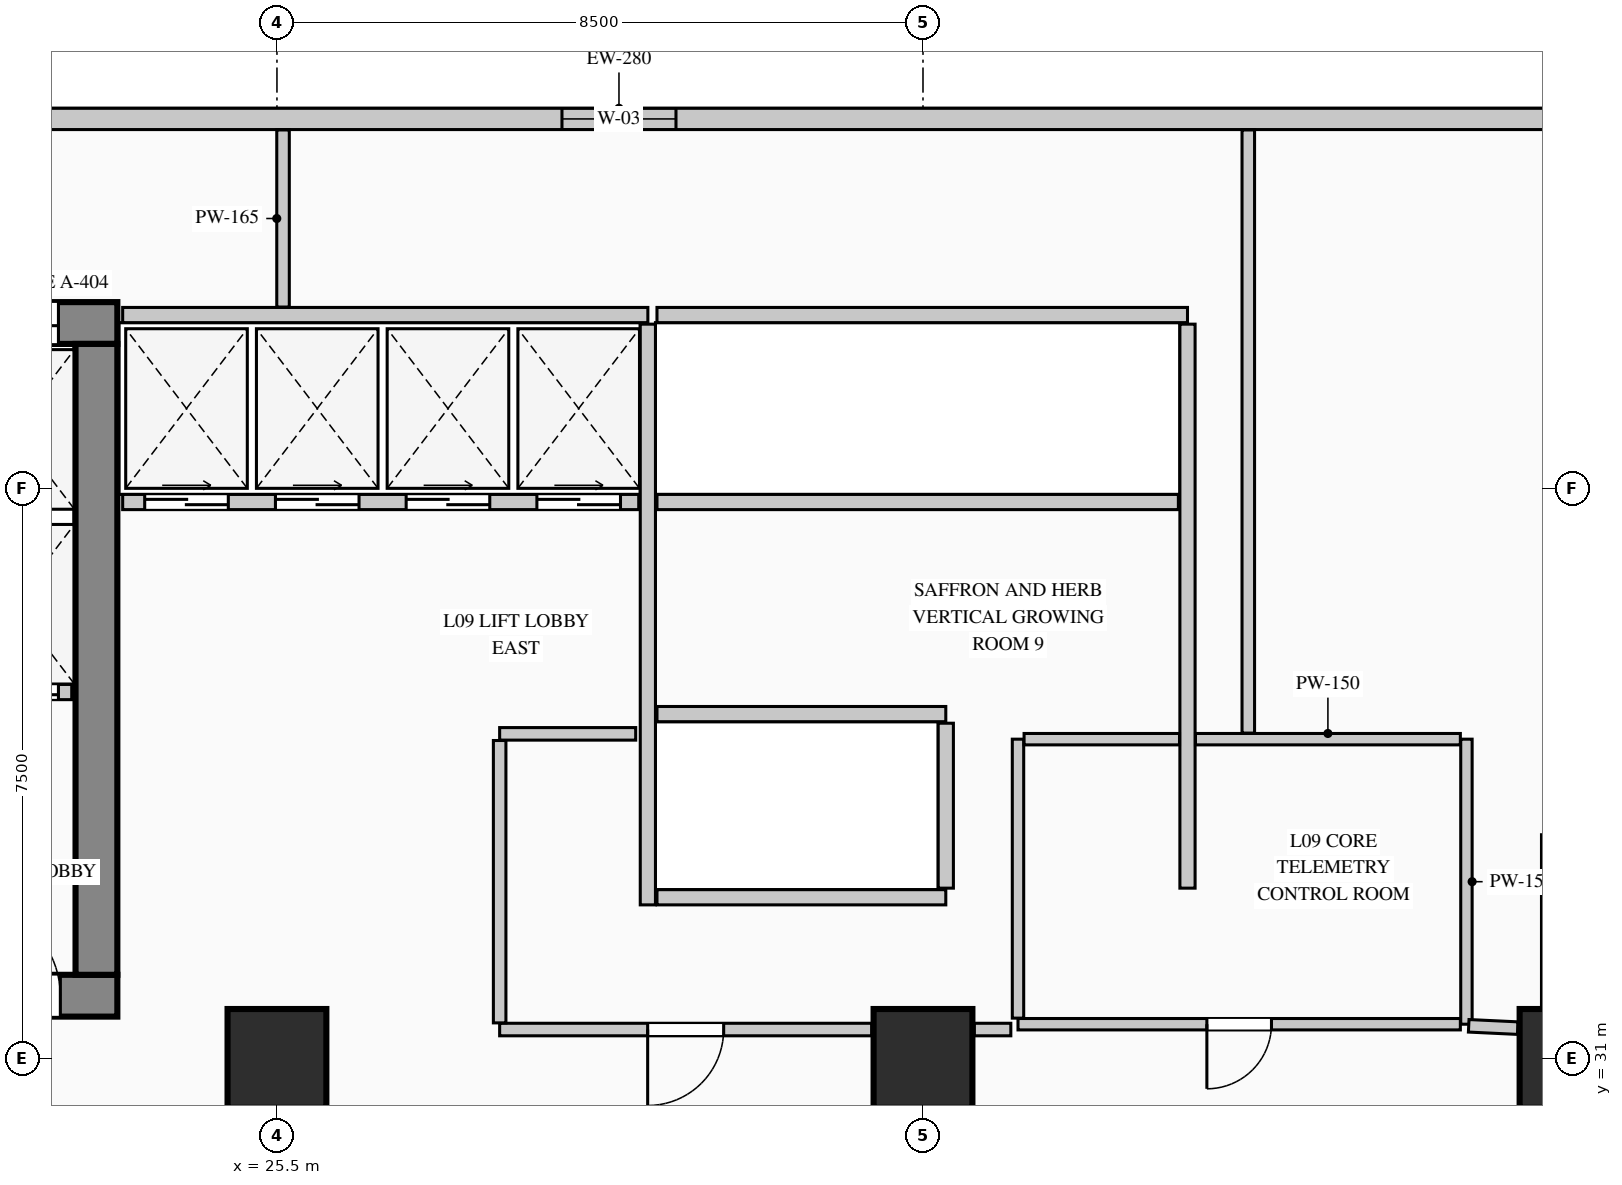
"""IFC4 building model, lengths in metres.
Left out: names, types, materials, properties, quantities, classifications, styles, units other than length and angle.
Written with IfcOpenShell. Run it as: python <this file> out.ifc"""

import sys

from ifc_helpers import new_model, si_unit, direction, frame, frame_2d, origin, origin_2d, place, context, subcontext, project, spatial, rectangle, extrude, element, fill, save


model = new_model("IFC4")
c1 = context("Model", 3, precision=1e-05, world=origin(), true_north=direction((0.0, 1.0)))
c2 = subcontext(c1, "Body", "Model", "MODEL_VIEW")
j1 = project(units=[si_unit("LENGTHUNIT", "METRE"), si_unit("PLANEANGLEUNIT", "RADIAN")], contexts=[c1])
p1 = place(None, origin())
s1 = spatial("IfcSite", under=j1, at=p1, CompositionType="ELEMENT")
p2 = place(p1, origin())
s2 = spatial("IfcBuilding", under=s1, at=p2, CompositionType="ELEMENT")
p3 = place(p2, frame((0.0, 0.0, 40.2)))
s3 = spatial("IfcBuildingStorey", under=s2, at=p3, CompositionType="ELEMENT", Elevation=40.2)
p4 = place(p3, frame((5.45, 40.675, 0.0), z_axis=(0.0, 0.0, 1.0), x_axis=(1.0, 0.0, 0.0)))
e1 = element("IfcWall", 1, at=p4, inside=s3, PredefinedType="SHEAR", context=c2, shape_type="SweptSolid", body=[
    extrude(rectangle(XDim=17.95, YDim=0.55, at=frame_2d((8.975, 0.0))), origin(), (0.0, 0.0, 1.0), 4.4),
])
p5 = place(p4, frame((15.995, 0.0, 0.0)))
e2 = element("IfcOpeningElement", 2, at=p5, cuts=e1, PredefinedType="OPENING", context=c2, shape_type="SweptSolid", body=[
    extrude(rectangle(XDim=1.18, YDim=2.25, at=frame_2d((0.59, 1.125))), frame((0.0, 0.285, 0.0), z_axis=(0.0, -1.0, 0.0), x_axis=(1.0, 0.0, 0.0)), (0.0, 0.0, 1.0), 0.57),
])
p6 = place(p3, frame((5.45, 31.825, 0.0), z_axis=(0.0, 0.0, 1.0), x_axis=(1.0, 0.0, 0.0)))
e3 = element("IfcWall", 3, at=p6, inside=s3, PredefinedType="SHEAR", context=c2, shape_type="SweptSolid", body=[
    extrude(rectangle(XDim=17.95, YDim=0.55, at=frame_2d((8.975, 0.0))), origin(), (0.0, 0.0, 1.0), 4.4),
])
p7 = place(p6, frame((3.2, 0.0, 0.0)))
e4 = element("IfcOpeningElement", 4, at=p7, cuts=e3, PredefinedType="OPENING", context=c2, shape_type="SweptSolid", body=[
    extrude(rectangle(XDim=1.2, YDim=2.2, at=frame_2d((0.6, 1.1))), frame((0.0, 0.285, 0.0), z_axis=(0.0, -1.0, 0.0), x_axis=(1.0, 0.0, 0.0)), (0.0, 0.0, 1.0), 0.57),
])
p8 = place(p6, frame((7.05, 0.0, 0.0)))
e5 = element("IfcOpeningElement", 5, at=p8, cuts=e3, PredefinedType="OPENING", context=c2, shape_type="SweptSolid", body=[
    extrude(rectangle(XDim=1.2, YDim=2.2, at=frame_2d((0.6, 1.1))), frame((0.0, 0.285, 0.0), z_axis=(0.0, -1.0, 0.0), x_axis=(1.0, 0.0, 0.0)), (0.0, 0.0, 1.0), 0.57),
])
p9 = place(p6, frame((8.9, 0.0, 0.0)))
e6 = element("IfcOpeningElement", 6, at=p9, cuts=e3, PredefinedType="OPENING", context=c2, shape_type="SweptSolid", body=[
    extrude(rectangle(XDim=1.15, YDim=2.2, at=frame_2d((0.575, 1.1))), frame((0.0, 0.285, 0.0), z_axis=(0.0, -1.0, 0.0), x_axis=(1.0, 0.0, 0.0)), (0.0, 0.0, 1.0), 0.57),
])
p10 = place(p6, frame((16.0, 0.0, 0.0)))
e7 = element("IfcOpeningElement", 7, at=p10, cuts=e3, PredefinedType="OPENING", context=c2, shape_type="SweptSolid", body=[
    extrude(rectangle(XDim=1.2, YDim=2.2, at=frame_2d((0.6, 1.1))), frame((0.0, 0.285, 0.0), z_axis=(0.0, -1.0, 0.0), x_axis=(1.0, 0.0, 0.0)), (0.0, 0.0, 1.0), 0.57),
])
p11 = place(p3, frame((23.125, 32.1, 0.0), z_axis=(0.0, 0.0, 1.0), x_axis=(0.0, 1.0, 0.0)))
e8 = element("IfcWall", 8, at=p11, inside=s3, PredefinedType="SHEAR", context=c2, shape_type="SweptSolid", body=[
    extrude(rectangle(XDim=8.3, YDim=0.55, at=frame_2d((4.15, 0.0))), origin(), (0.0, 0.0, 1.0), 4.4),
])
for number, where, z_axis, x_axis in (
    (9, (25.5, 31.0, 0.0), (0.0, 0.0, 1.0), (1.0, 0.0, 0.0)),
    (10, (34.0, 31.0, 0.0), (0.0, 0.0, 1.0), (1.0, 0.0, 0.0)),
    (11, (42.5, 31.0, 0.0), (0.0, 0.0, 1.0), (1.0, 0.0, 0.0)),
):
    element("IfcColumn", number, at=place(p3, frame(where, z_axis=z_axis, x_axis=x_axis)), inside=s3, PredefinedType="COLUMN", context=c2, shape_type="SweptSolid", body=[
        extrude(rectangle(XDim=1.3, YDim=1.3, at=origin_2d()), origin(), (0.0, 0.0, 1.0), 4.4),
    ])
p12 = place(p3, frame((4.84, 43.36, 0.0), z_axis=(0.0, 0.0, 1.0), x_axis=(1.0, 0.0, 0.0)))
e12 = element("IfcWall", 12, at=p12, inside=s3, PredefinedType="STANDARD", context=c2, shape_type="SweptSolid", body=[
    extrude(rectangle(XDim=50.32, YDim=0.28, at=frame_2d((25.16, 0.0))), origin(), (0.0, 0.0, 1.0), 4.1),
])
p13 = place(p12, frame((24.41, 0.0, 0.9)))
e13 = element("IfcOpeningElement", 13, at=p13, cuts=e12, PredefinedType="OPENING", context=c2, shape_type="SweptSolid", body=[
    extrude(rectangle(XDim=1.5, YDim=1.8, at=frame_2d((0.75, 0.9))), frame((0.0, 0.15, 0.0), z_axis=(0.0, -1.0, 0.0), x_axis=(1.0, 0.0, 0.0)), (0.0, 0.0, 1.0), 0.3),
])
p14 = place(p3, frame((21.3, 35.82, 0.0), z_axis=(0.0, 0.0, 1.0), x_axis=(1.0, 0.0, 0.0)))
e14 = element("IfcWall", 14, at=p14, inside=s3, PredefinedType="PARTITIONING", context=c2, shape_type="SweptSolid", body=[
    extrude(rectangle(XDim=1.5, YDim=0.2, at=frame_2d((0.75, 0.0))), origin(), (0.0, 0.0, 1.0), 4.1),
])
p15 = place(p14, frame((0.145, 0.0, 0.0)))
e15 = element("IfcOpeningElement", 15, at=p15, cuts=e14, PredefinedType="OPENING", context=c2, shape_type="SweptSolid", body=[
    extrude(rectangle(XDim=1.18, YDim=2.25, at=frame_2d((0.59, 1.125))), frame((0.0, 0.11, 0.0), z_axis=(0.0, -1.0, 0.0), x_axis=(1.0, 0.0, 0.0)), (0.0, 0.0, 1.0), 0.22),
])
p16 = place(p3, frame((23.47, 40.78, 0.0), z_axis=(0.0, 0.0, 1.0), x_axis=(1.0, 0.0, 0.0)))
e16 = element("IfcWall", 16, at=p16, inside=s3, PredefinedType="PARTITIONING", context=c2, shape_type="SweptSolid", body=[
    extrude(rectangle(XDim=6.91, YDim=0.2, at=frame_2d((3.455, 0.0))), origin(), (0.0, 0.0, 1.0), 4.1),
])
p17 = place(p3, frame((30.38, 33.02, 0.0), z_axis=(0.0, 0.0, 1.0), x_axis=(0.0, 1.0, 0.0)))
e17 = element("IfcWall", 17, at=p17, inside=s3, PredefinedType="PARTITIONING", context=c2, shape_type="SweptSolid", body=[
    extrude(rectangle(XDim=7.64, YDim=0.2, at=frame_2d((3.82, 0.0))), origin(), (0.0, 0.0, 1.0), 4.1),
])
p18 = place(p3, frame((23.47, 38.32, 0.0), z_axis=(0.0, 0.0, 1.0), x_axis=(1.0, 0.0, 0.0)))
e18 = element("IfcWall", 18, at=p18, inside=s3, PredefinedType="PARTITIONING", context=c2, shape_type="SweptSolid", body=[
    extrude(rectangle(XDim=6.79, YDim=0.2, at=frame_2d((3.395, 0.0))), origin(), (0.0, 0.0, 1.0), 4.1),
])
p19 = place(p18, frame((0.29, 0.0, 0.0)))
e19 = element("IfcOpeningElement", 19, at=p19, cuts=e18, PredefinedType="OPENING", context=c2, shape_type="SweptSolid", body=[
    extrude(rectangle(XDim=1.1, YDim=2.2, at=frame_2d((0.55, 1.1))), frame((0.0, 0.11, 0.0), z_axis=(0.0, -1.0, 0.0), x_axis=(1.0, 0.0, 0.0)), (0.0, 0.0, 1.0), 0.22),
])
p20 = place(p18, frame((2.01, 0.0, 0.0)))
e20 = element("IfcOpeningElement", 20, at=p20, cuts=e18, PredefinedType="OPENING", context=c2, shape_type="SweptSolid", body=[
    extrude(rectangle(XDim=1.1, YDim=2.2, at=frame_2d((0.55, 1.1))), frame((0.0, 0.11, 0.0), z_axis=(0.0, -1.0, 0.0), x_axis=(1.0, 0.0, 0.0)), (0.0, 0.0, 1.0), 0.22),
])
p21 = place(p18, frame((3.73, 0.0, 0.0)))
e21 = element("IfcOpeningElement", 21, at=p21, cuts=e18, PredefinedType="OPENING", context=c2, shape_type="SweptSolid", body=[
    extrude(rectangle(XDim=1.1, YDim=2.2, at=frame_2d((0.55, 1.1))), frame((0.0, 0.11, 0.0), z_axis=(0.0, -1.0, 0.0), x_axis=(1.0, 0.0, 0.0)), (0.0, 0.0, 1.0), 0.22),
])
p22 = place(p18, frame((5.45, 0.0, 0.0)))
e22 = element("IfcOpeningElement", 22, at=p22, cuts=e18, PredefinedType="OPENING", context=c2, shape_type="SweptSolid", body=[
    extrude(rectangle(XDim=1.1, YDim=2.2, at=frame_2d((0.55, 1.1))), frame((0.0, 0.11, 0.0), z_axis=(0.0, -1.0, 0.0), x_axis=(1.0, 0.0, 0.0)), (0.0, 0.0, 1.0), 0.22),
])
p23 = place(p3, frame((30.5, 40.78, 0.0), z_axis=(0.0, 0.0, 1.0), x_axis=(1.0, 0.0, 0.0)))
e23 = element("IfcWall", 23, at=p23, inside=s3, PredefinedType="PARTITIONING", context=c2, shape_type="SweptSolid", body=[
    extrude(rectangle(XDim=6.98, YDim=0.2, at=frame_2d((3.49, 0.0))), origin(), (0.0, 0.0, 1.0), 4.1),
])
p24 = place(p3, frame((37.48, 33.24, 0.0), z_axis=(0.0, 0.0, 1.0), x_axis=(0.0, 1.0, 0.0)))
e24 = element("IfcWall", 24, at=p24, inside=s3, PredefinedType="PARTITIONING", context=c2, shape_type="SweptSolid", body=[
    extrude(rectangle(XDim=7.42, YDim=0.2, at=frame_2d((3.71, 0.0))), origin(), (0.0, 0.0, 1.0), 4.1),
])
p25 = place(p3, frame((30.5, 38.32, 0.0), z_axis=(0.0, 0.0, 1.0), x_axis=(1.0, 0.0, 0.0)))
e25 = element("IfcWall", 25, at=p25, inside=s3, PredefinedType="PARTITIONING", context=c2, shape_type="SweptSolid", body=[
    extrude(rectangle(XDim=6.86, YDim=0.2, at=frame_2d((3.43, 0.0))), origin(), (0.0, 0.0, 1.0), 4.1),
])
for number, where, z_axis, x_axis in (
    (26, (30.5, 35.53, 0.0), (0.0, 0.0, 1.0), (1.0, 0.0, 0.0)),
    (27, (30.5, 33.12, 0.0), (0.0, 0.0, 1.0), (1.0, 0.0, 0.0)),
):
    element("IfcWall", number, at=place(p3, frame(where, z_axis=z_axis, x_axis=x_axis)), inside=s3, PredefinedType="PARTITIONING", context=c2, shape_type="SweptSolid", body=[
        extrude(rectangle(XDim=3.8, YDim=0.2, at=frame_2d((1.9, 0.0))), origin(), (0.0, 0.0, 1.0), 4.1),
    ])
p26 = place(p3, frame((34.3, 33.24, 0.0), z_axis=(0.0, 0.0, 1.0), x_axis=(0.0, 1.0, 0.0)))
e28 = element("IfcWall", 28, at=p26, inside=s3, PredefinedType="PARTITIONING", context=c2, shape_type="SweptSolid", body=[
    extrude(rectangle(XDim=2.17, YDim=0.2, at=frame_2d((1.085, 0.0))), origin(), (0.0, 0.0, 1.0), 4.1),
])
p27 = place(p3, frame((41.15, 35.2, 0.0), z_axis=(0.0, 0.0, 1.0), x_axis=(0.0, -1.0, 0.0)))
e29 = element("IfcWall", 29, at=p27, inside=s3, PredefinedType="PARTITIONING", context=c2, shape_type="SweptSolid", body=[
    extrude(rectangle(XDim=3.75, YDim=0.15, at=frame_2d((1.875, 0.0))), origin(), (0.0, 0.0, 1.0), 4.1),
])
p28 = place(p3, frame((41.07, 31.45, 0.0), z_axis=(0.0, 0.0, 1.0), x_axis=(-1.0, 0.0, 0.0)))
e30 = element("IfcWall", 30, at=p28, inside=s3, PredefinedType="PARTITIONING", context=c2, shape_type="SweptSolid", body=[
    extrude(rectangle(XDim=5.82, YDim=0.15, at=frame_2d((2.91, 0.0))), origin(), (0.0, 0.0, 1.0), 4.1),
])
p29 = place(p28, frame((2.485, 0.0, 0.0)))
e31 = element("IfcOpeningElement", 31, at=p29, cuts=e30, PredefinedType="OPENING", context=c2, shape_type="SweptSolid", body=[
    extrude(rectangle(XDim=0.85, YDim=2.1, at=frame_2d((0.425, 1.05))), frame((0.0, 0.085, 0.0), z_axis=(0.0, -1.0, 0.0), x_axis=(1.0, 0.0, 0.0)), (0.0, 0.0, 1.0), 0.17),
])
p30 = place(p3, frame((35.25, 31.53, 0.0), z_axis=(0.0, 0.0, 1.0), x_axis=(0.0, 1.0, 0.0)))
e32 = element("IfcWall", 32, at=p30, inside=s3, PredefinedType="PARTITIONING", context=c2, shape_type="SweptSolid", body=[
    extrude(rectangle(XDim=3.67, YDim=0.15, at=frame_2d((1.835, 0.0))), origin(), (0.0, 0.0, 1.0), 4.1),
])
p31 = place(p3, frame((35.33, 35.2, 0.0), z_axis=(0.0, 0.0, 1.0), x_axis=(1.0, 0.0, 0.0)))
e33 = element("IfcWall", 33, at=p31, inside=s3, PredefinedType="PARTITIONING", context=c2, shape_type="SweptSolid", body=[
    extrude(rectangle(XDim=2.045, YDim=0.15, at=frame_2d((1.022, 0.0))), origin(), (0.0, 0.0, 1.0), 4.1),
])
p32 = place(p3, frame((37.585, 35.2, 0.0), z_axis=(0.0, 0.0, 1.0), x_axis=(1.0, 0.0, 0.0)))
e34 = element("IfcWall", 34, at=p32, inside=s3, PredefinedType="PARTITIONING", context=c2, shape_type="SweptSolid", body=[
    extrude(rectangle(XDim=3.485, YDim=0.15, at=frame_2d((1.743, 0.0))), origin(), (0.0, 0.0, 1.0), 4.1),
])
p33 = place(p3, frame((38.28, 35.28, 0.0), z_axis=(0.0, 0.0, 1.0), x_axis=(0.0, 1.0, 0.0)))
e35 = element("IfcWall", 35, at=p33, inside=s3, PredefinedType="PARTITIONING", context=c2, shape_type="SweptSolid", body=[
    extrude(rectangle(XDim=7.935, YDim=0.165, at=frame_2d((3.968, 0.0))), origin(), (0.0, 0.0, 1.0), 4.1),
])
p34 = place(p3, frame((42.22, 33.942, 0.0), z_axis=(0.0, 0.0, 1.0), x_axis=(0.0, -1.0, 0.0)))
e36 = element("IfcWall", 36, at=p34, inside=s3, PredefinedType="PARTITIONING", context=c2, shape_type="SweptSolid", body=[
    extrude(rectangle(XDim=2.267, YDim=0.165, at=frame_2d((1.134, 0.0))), origin(), (0.0, 0.0, 1.0), 4.1),
])
p35 = place(p3, frame((41.825, 31.398, 0.0), z_axis=(0.0, 0.0, 1.0), x_axis=(-0.998882632516, 0.04725977633, 0.0)))
e37 = element("IfcWall", 37, at=p35, inside=s3, PredefinedType="PARTITIONING", context=c2, shape_type="SweptSolid", body=[
    extrude(rectangle(XDim=0.646, YDim=0.165, at=frame_2d((0.323, 0.0))), origin(), (0.0, 0.0, 1.0), 4.1),
])
p36 = place(p3, frame((28.43, 35.27, 0.0), z_axis=(0.0, 0.0, 1.0), x_axis=(1.0, 0.0, 0.0)))
e38 = element("IfcWall", 38, at=p36, inside=s3, PredefinedType="PARTITIONING", context=c2, shape_type="SweptSolid", body=[
    extrude(rectangle(XDim=1.79, YDim=0.165, at=frame_2d((0.895, 0.0))), origin(), (0.0, 0.0, 1.0), 4.1),
])
p37 = place(p3, frame((25.58, 40.885, 0.0), z_axis=(0.0, 0.0, 1.0), x_axis=(0.0, 1.0, 0.0)))
e39 = element("IfcWall", 39, at=p37, inside=s3, PredefinedType="PARTITIONING", context=c2, shape_type="SweptSolid", body=[
    extrude(rectangle(XDim=2.33, YDim=0.165, at=frame_2d((1.165, 0.0))), origin(), (0.0, 0.0, 1.0), 4.1),
])
p38 = place(p3, frame((35.156, 31.38, 0.0), z_axis=(0.0, 0.0, 1.0), x_axis=(-1.0, 0.0, 0.0)))
e40 = element("IfcWall", 40, at=p38, inside=s3, PredefinedType="PARTITIONING", context=c2, shape_type="SweptSolid", body=[
    extrude(rectangle(XDim=0.48, YDim=0.165, at=frame_2d((0.24, 0.0))), origin(), (0.0, 0.0, 1.0), 4.1),
])
p39 = place(p3, frame((33.325, 31.38, 0.0), z_axis=(0.0, 0.0, 1.0), x_axis=(-1.0, 0.0, 0.0)))
e41 = element("IfcWall", 41, at=p39, inside=s3, PredefinedType="PARTITIONING", context=c2, shape_type="SweptSolid", body=[
    extrude(rectangle(XDim=4.895, YDim=0.165, at=frame_2d((2.448, 0.0))), origin(), (0.0, 0.0, 1.0), 4.1),
])
p40 = place(p39, frame((1.948, 0.0, 0.0)))
e42 = element("IfcOpeningElement", 42, at=p40, cuts=e41, PredefinedType="OPENING", context=c2, shape_type="SweptSolid", body=[
    extrude(rectangle(XDim=1.0, YDim=2.15, at=frame_2d((0.5, 1.075))), frame((0.0, 0.093, 0.0), z_axis=(0.0, -1.0, 0.0), x_axis=(1.0, 0.0, 0.0)), (0.0, 0.0, 1.0), 0.185),
])
p41 = place(p3, frame((28.43, 31.468, 0.0), z_axis=(0.0, 0.0, 1.0), x_axis=(0.0, 1.0, 0.0)))
e43 = element("IfcWall", 43, at=p41, inside=s3, PredefinedType="PARTITIONING", context=c2, shape_type="SweptSolid", body=[
    extrude(rectangle(XDim=3.715, YDim=0.165, at=frame_2d((1.857, 0.0))), origin(), (0.0, 0.0, 1.0), 4.1),
])
p42 = place(p13, origin())
e44 = element("IfcWindow", 44, at=p42, inside=s3, PartitioningType="SINGLE_PANEL", PredefinedType="WINDOW", context=c2, shape_type="SweptSolid", body=[
    extrude(rectangle(XDim=1.5, YDim=1.8, at=frame_2d((0.75, 0.9))), frame((0.0, 0.03, 0.0), z_axis=(0.0, -1.0, 0.0), x_axis=(1.0, 0.0, 0.0)), (0.0, 0.0, 1.0), 0.06),
])
fill(e13, e44)
p43 = place(p10, origin())
e45 = element("IfcDoor", 45, at=p43, inside=s3, OperationType="SINGLE_SWING_LEFT", PredefinedType="DOOR", context=c2, shape_type="SweptSolid", body=[
    extrude(rectangle(XDim=1.2, YDim=2.2, at=frame_2d((0.6, 1.1))), frame((0.0, 0.025, 0.0), z_axis=(0.0, -1.0, 0.0), x_axis=(1.0, 0.0, 0.0)), (0.0, 0.0, 1.0), 0.05),
])
fill(e7, e45)
p44 = place(p5, origin())
e46 = element("IfcDoor", 46, at=p44, inside=s3, OperationType="DOUBLE_DOOR_SLIDING", PredefinedType="DOOR", context=c2, shape_type="SweptSolid", body=[
    extrude(rectangle(XDim=1.18, YDim=2.25, at=frame_2d((0.59, 1.125))), frame((0.0, 0.025, 0.0), z_axis=(0.0, -1.0, 0.0), x_axis=(1.0, 0.0, 0.0)), (0.0, 0.0, 1.0), 0.05),
])
fill(e2, e46)
p45 = place(p15, origin())
e47 = element("IfcDoor", 47, at=p45, inside=s3, OperationType="DOUBLE_DOOR_SLIDING", PredefinedType="DOOR", context=c2, shape_type="SweptSolid", body=[
    extrude(rectangle(XDim=1.18, YDim=2.25, at=frame_2d((0.59, 1.125))), frame((0.0, 0.025, 0.0), z_axis=(0.0, -1.0, 0.0), x_axis=(1.0, 0.0, 0.0)), (0.0, 0.0, 1.0), 0.05),
])
fill(e15, e47)
p46 = place(p19, origin())
e48 = element("IfcDoor", 48, at=p46, inside=s3, OperationType="DOUBLE_DOOR_SLIDING", PredefinedType="DOOR", context=c2, shape_type="SweptSolid", body=[
    extrude(rectangle(XDim=1.1, YDim=2.2, at=frame_2d((0.55, 1.1))), frame((0.0, 0.025, 0.0), z_axis=(0.0, -1.0, 0.0), x_axis=(1.0, 0.0, 0.0)), (0.0, 0.0, 1.0), 0.05),
])
fill(e19, e48)
p47 = place(p20, origin())
e49 = element("IfcDoor", 49, at=p47, inside=s3, OperationType="DOUBLE_DOOR_SLIDING", PredefinedType="DOOR", context=c2, shape_type="SweptSolid", body=[
    extrude(rectangle(XDim=1.1, YDim=2.2, at=frame_2d((0.55, 1.1))), frame((0.0, 0.025, 0.0), z_axis=(0.0, -1.0, 0.0), x_axis=(1.0, 0.0, 0.0)), (0.0, 0.0, 1.0), 0.05),
])
fill(e20, e49)
p48 = place(p21, origin())
e50 = element("IfcDoor", 50, at=p48, inside=s3, OperationType="DOUBLE_DOOR_SLIDING", PredefinedType="DOOR", context=c2, shape_type="SweptSolid", body=[
    extrude(rectangle(XDim=1.1, YDim=2.2, at=frame_2d((0.55, 1.1))), frame((0.0, 0.025, 0.0), z_axis=(0.0, -1.0, 0.0), x_axis=(1.0, 0.0, 0.0)), (0.0, 0.0, 1.0), 0.05),
])
fill(e21, e50)
p49 = place(p22, origin())
e51 = element("IfcDoor", 51, at=p49, inside=s3, OperationType="DOUBLE_DOOR_SLIDING", PredefinedType="DOOR", context=c2, shape_type="SweptSolid", body=[
    extrude(rectangle(XDim=1.1, YDim=2.2, at=frame_2d((0.55, 1.1))), frame((0.0, 0.025, 0.0), z_axis=(0.0, -1.0, 0.0), x_axis=(1.0, 0.0, 0.0)), (0.0, 0.0, 1.0), 0.05),
])
fill(e22, e51)
p50 = place(p29, origin())
e52 = element("IfcDoor", 52, at=p50, inside=s3, OperationType="SINGLE_SWING_RIGHT", PredefinedType="DOOR", context=c2, shape_type="SweptSolid", body=[
    extrude(rectangle(XDim=0.85, YDim=2.1, at=frame_2d((0.425, 1.05))), frame((0.0, 0.025, 0.0), z_axis=(0.0, -1.0, 0.0), x_axis=(1.0, 0.0, 0.0)), (0.0, 0.0, 1.0), 0.05),
])
fill(e31, e52)
p51 = place(p40, origin())
e53 = element("IfcDoor", 53, at=p51, inside=s3, OperationType="SINGLE_SWING_RIGHT", PredefinedType="DOOR", context=c2, shape_type="SweptSolid", body=[
    extrude(rectangle(XDim=1.0, YDim=2.15, at=frame_2d((0.5, 1.075))), frame((0.0, 0.025, 0.0), z_axis=(0.0, -1.0, 0.0), x_axis=(1.0, 0.0, 0.0)), (0.0, 0.0, 1.0), 0.05),
])
fill(e42, e53)
save(model, sys.argv[1])
